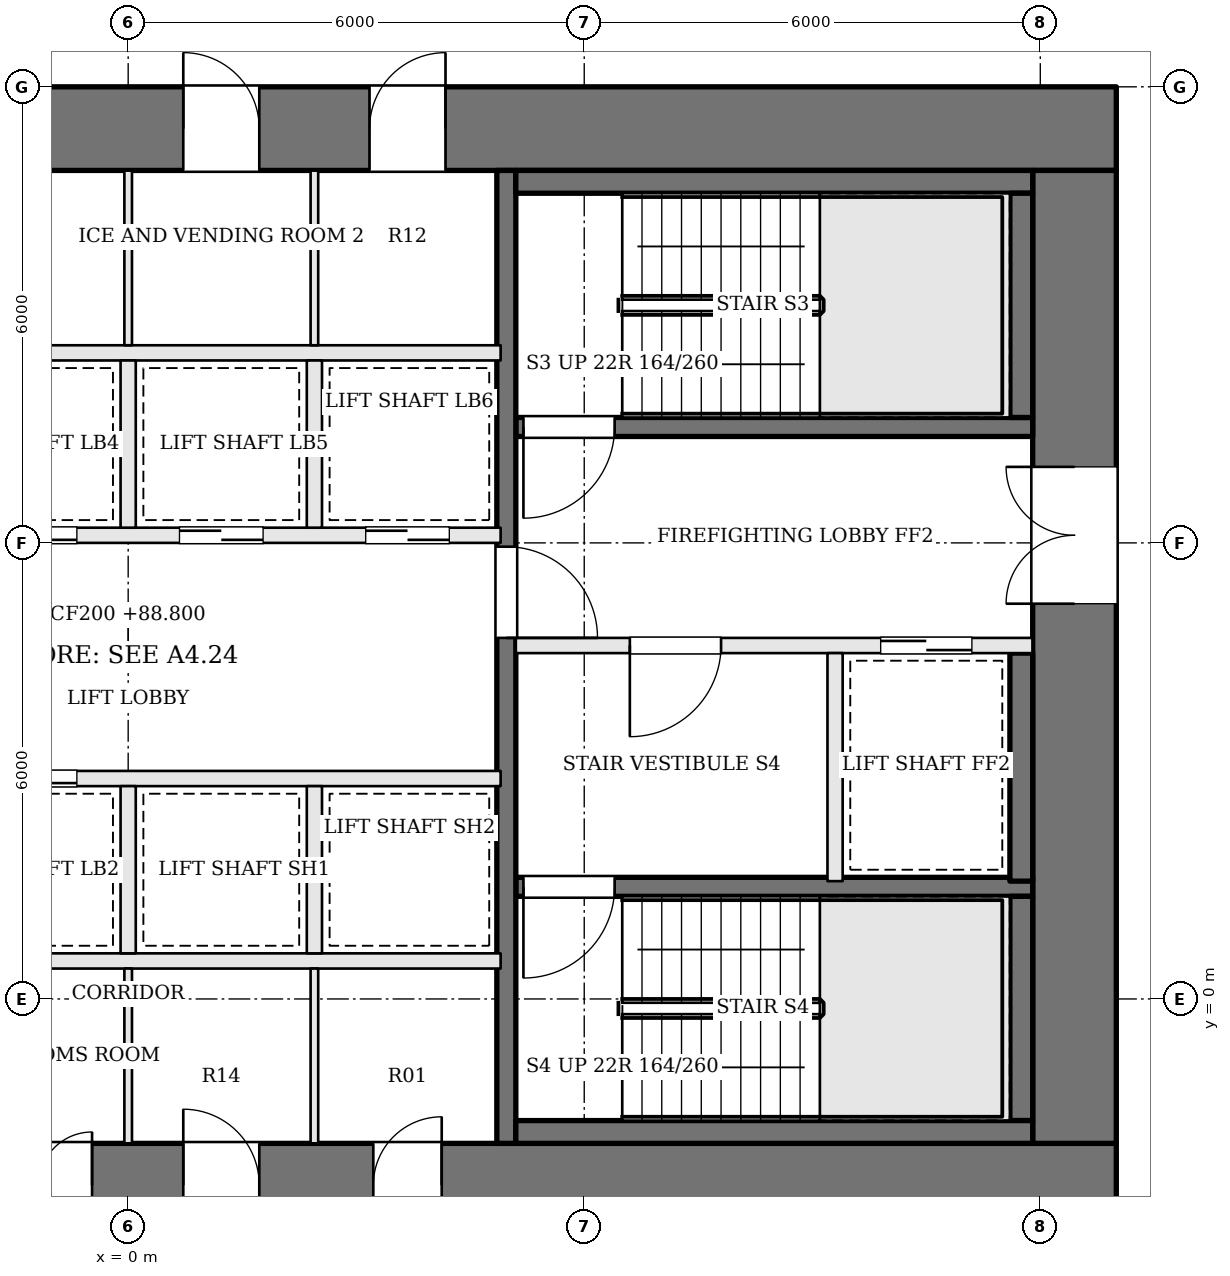
"""IFC4 building model, lengths in metres.
Left out: names, types, materials, properties, quantities, classifications, styles, units other than length and angle.
Written with IfcOpenShell. Run it as: python <this file> out.ifc"""

import sys

from ifc_helpers import new_model, si_unit, direction, frame, frame_2d, origin, place, context, subcontext, project, spatial, rectangle, extrude, element, fill, save


model = new_model("IFC4")
c1 = context("Model", 3, precision=1e-05, world=origin(), true_north=direction((0.0, 1.0)))
c2 = subcontext(c1, "Body", "Model", "MODEL_VIEW")
j1 = project(units=[si_unit("LENGTHUNIT", "METRE"), si_unit("PLANEANGLEUNIT", "RADIAN")], contexts=[c1])
p1 = place(None, origin())
s1 = spatial("IfcSite", under=j1, at=p1, CompositionType="ELEMENT")
p2 = place(p1, origin())
s2 = spatial("IfcBuilding", under=s1, at=p2, CompositionType="ELEMENT")
p3 = place(p2, frame((0.0, 0.0, 88.8)))
s3 = spatial("IfcBuildingStorey", under=s2, at=p3, CompositionType="ELEMENT", Elevation=88.8)
p4 = place(p3, frame((-13.0, 11.45, 0.0), z_axis=(0.0, 0.0, 1.0), x_axis=(1.0, 0.0, 0.0)))
e1 = element("IfcWall", 1, at=p4, inside=s3, PredefinedType="SHEAR", context=c2, shape_type="SweptSolid", body=[
    extrude(rectangle(XDim=26.0, YDim=1.1, at=frame_2d((13.0, 0.0))), origin(), (0.0, 0.0, 1.0), 3.6),
])
p5 = place(p4, frame((8.575, 0.0, 0.0)))
e2 = element("IfcOpeningElement", 2, at=p5, cuts=e1, PredefinedType="OPENING", context=c2, shape_type="SweptSolid", body=[
    extrude(rectangle(XDim=0.7, YDim=2.1, at=frame_2d((0.35, 1.05))), frame((0.0, 0.56, 0.0), z_axis=(0.0, -1.0, 0.0), x_axis=(1.0, 0.0, 0.0)), (0.0, 0.0, 1.0), 1.12),
])
p6 = place(p4, frame((10.875, 0.0, 0.0)))
e3 = element("IfcOpeningElement", 3, at=p6, cuts=e1, PredefinedType="OPENING", context=c2, shape_type="SweptSolid", body=[
    extrude(rectangle(XDim=1.0, YDim=2.1, at=frame_2d((0.5, 1.05))), frame((0.0, 0.56, 0.0), z_axis=(0.0, -1.0, 0.0), x_axis=(1.0, 0.0, 0.0)), (0.0, 0.0, 1.0), 1.12),
])
p7 = place(p4, frame((13.725, 0.0, 0.0)))
e4 = element("IfcOpeningElement", 4, at=p7, cuts=e1, PredefinedType="OPENING", context=c2, shape_type="SweptSolid", body=[
    extrude(rectangle(XDim=1.0, YDim=2.1, at=frame_2d((0.5, 1.05))), frame((0.0, 0.56, 0.0), z_axis=(0.0, -1.0, 0.0), x_axis=(1.0, 0.0, 0.0)), (0.0, 0.0, 1.0), 1.12),
])
p8 = place(p4, frame((16.175, 0.0, 0.0)))
e5 = element("IfcOpeningElement", 5, at=p8, cuts=e1, PredefinedType="OPENING", context=c2, shape_type="SweptSolid", body=[
    extrude(rectangle(XDim=1.0, YDim=2.1, at=frame_2d((0.5, 1.05))), frame((0.0, 0.56, 0.0), z_axis=(0.0, -1.0, 0.0), x_axis=(1.0, 0.0, 0.0)), (0.0, 0.0, 1.0), 1.12),
])
p9 = place(p3, frame((-13.0, -2.45, 0.0), z_axis=(0.0, 0.0, 1.0), x_axis=(1.0, 0.0, 0.0)))
e6 = element("IfcWall", 6, at=p9, inside=s3, PredefinedType="SHEAR", context=c2, shape_type="SweptSolid", body=[
    extrude(rectangle(XDim=26.0, YDim=1.1, at=frame_2d((13.0, 0.0))), origin(), (0.0, 0.0, 1.0), 3.6),
])
p10 = place(p9, frame((9.225, 0.0, 0.0)))
e7 = element("IfcOpeningElement", 7, at=p10, cuts=e6, PredefinedType="OPENING", context=c2, shape_type="SweptSolid", body=[
    extrude(rectangle(XDim=1.0, YDim=2.1, at=frame_2d((0.5, 1.05))), frame((0.0, 0.56, 0.0), z_axis=(0.0, -1.0, 0.0), x_axis=(1.0, 0.0, 0.0)), (0.0, 0.0, 1.0), 1.12),
])
p11 = place(p9, frame((11.825, 0.0, 0.0)))
e8 = element("IfcOpeningElement", 8, at=p11, cuts=e6, PredefinedType="OPENING", context=c2, shape_type="SweptSolid", body=[
    extrude(rectangle(XDim=0.7, YDim=2.1, at=frame_2d((0.35, 1.05))), frame((0.0, 0.56, 0.0), z_axis=(0.0, -1.0, 0.0), x_axis=(1.0, 0.0, 0.0)), (0.0, 0.0, 1.0), 1.12),
])
p12 = place(p9, frame((13.725, 0.0, 0.0)))
e9 = element("IfcOpeningElement", 9, at=p12, cuts=e6, PredefinedType="OPENING", context=c2, shape_type="SweptSolid", body=[
    extrude(rectangle(XDim=1.0, YDim=2.1, at=frame_2d((0.5, 1.05))), frame((0.0, 0.56, 0.0), z_axis=(0.0, -1.0, 0.0), x_axis=(1.0, 0.0, 0.0)), (0.0, 0.0, 1.0), 1.12),
])
p13 = place(p9, frame((16.225, 0.0, 0.0)))
e10 = element("IfcOpeningElement", 10, at=p13, cuts=e6, PredefinedType="OPENING", context=c2, shape_type="SweptSolid", body=[
    extrude(rectangle(XDim=0.9, YDim=2.1, at=frame_2d((0.45, 1.05))), frame((0.0, 0.56, 0.0), z_axis=(0.0, -1.0, 0.0), x_axis=(1.0, 0.0, 0.0)), (0.0, 0.0, 1.0), 1.12),
])
p14 = place(p3, frame((12.45, -1.9, 0.0), z_axis=(0.0, 0.0, 1.0), x_axis=(0.0, 1.0, 0.0)))
e11 = element("IfcWall", 11, at=p14, inside=s3, PredefinedType="SHEAR", context=c2, shape_type="SweptSolid", body=[
    extrude(rectangle(XDim=12.8, YDim=1.1, at=frame_2d((6.4, 0.0))), origin(), (0.0, 0.0, 1.0), 3.6),
])
p15 = place(p14, frame((7.1, 0.0, 0.0)))
e12 = element("IfcOpeningElement", 12, at=p15, cuts=e11, PredefinedType="OPENING", context=c2, shape_type="SweptSolid", body=[
    extrude(rectangle(XDim=1.8, YDim=2.1, at=frame_2d((0.9, 1.05))), frame((0.0, 0.56, 0.0), z_axis=(0.0, -1.0, 0.0), x_axis=(1.0, 0.0, 0.0)), (0.0, 0.0, 1.0), 1.12),
])
p16 = place(p3, frame((11.9, 7.525, 0.0), z_axis=(0.0, 0.0, 1.0), x_axis=(-1.0, 0.0, 0.0)))
e13 = element("IfcWall", 13, at=p16, inside=s3, PredefinedType="SOLIDWALL", context=c2, shape_type="SweptSolid", body=[
    extrude(rectangle(XDim=6.8, YDim=0.25, at=frame_2d((3.4, 0.0))), origin(), (0.0, 0.0, 1.0), 3.4),
])
p17 = place(p16, frame((5.5, 0.0, 0.0)))
e14 = element("IfcOpeningElement", 14, at=p17, cuts=e13, PredefinedType="OPENING", context=c2, shape_type="SweptSolid", body=[
    extrude(rectangle(XDim=1.2, YDim=2.1, at=frame_2d((0.6, 1.05))), frame((0.0, 0.135, 0.0), z_axis=(0.0, -1.0, 0.0), x_axis=(1.0, 0.0, 0.0)), (0.0, 0.0, 1.0), 0.27),
])
p18 = place(p3, frame((11.9, 4.65, 0.0), z_axis=(0.0, 0.0, 1.0), x_axis=(-1.0, 0.0, 0.0)))
e15 = element("IfcWall", 15, at=p18, inside=s3, PredefinedType="SOLIDWALL", context=c2, shape_type="SweptSolid", body=[
    extrude(rectangle(XDim=6.8, YDim=0.2, at=frame_2d((3.4, 0.0))), origin(), (0.0, 0.0, 1.0), 3.4),
])
p19 = place(p18, frame((4.1, 0.0, 0.0)))
e16 = element("IfcOpeningElement", 16, at=p19, cuts=e15, PredefinedType="OPENING", context=c2, shape_type="SweptSolid", body=[
    extrude(rectangle(XDim=1.2, YDim=2.1, at=frame_2d((0.6, 1.05))), frame((0.0, 0.11, 0.0), z_axis=(0.0, -1.0, 0.0), x_axis=(1.0, 0.0, 0.0)), (0.0, 0.0, 1.0), 0.22),
])
p20 = place(p18, frame((0.8, 0.0, 0.0)))
e17 = element("IfcOpeningElement", 17, at=p20, cuts=e15, PredefinedType="OPENING", context=c2, shape_type="SweptSolid", body=[
    extrude(rectangle(XDim=1.2, YDim=2.1, at=frame_2d((0.6, 1.05))), frame((0.0, 0.11, 0.0), z_axis=(0.0, -1.0, 0.0), x_axis=(1.0, 0.0, 0.0)), (0.0, 0.0, 1.0), 0.22),
])
p21 = place(p3, frame((11.9, 1.475, 0.0), z_axis=(0.0, 0.0, 1.0), x_axis=(-1.0, 0.0, 0.0)))
e18 = element("IfcWall", 18, at=p21, inside=s3, PredefinedType="SOLIDWALL", context=c2, shape_type="SweptSolid", body=[
    extrude(rectangle(XDim=6.8, YDim=0.25, at=frame_2d((3.4, 0.0))), origin(), (0.0, 0.0, 1.0), 3.4),
])
p22 = place(p21, frame((5.5, 0.0, 0.0)))
e19 = element("IfcOpeningElement", 19, at=p22, cuts=e18, PredefinedType="OPENING", context=c2, shape_type="SweptSolid", body=[
    extrude(rectangle(XDim=1.2, YDim=2.1, at=frame_2d((0.6, 1.05))), frame((0.0, 0.135, 0.0), z_axis=(0.0, -1.0, 0.0), x_axis=(1.0, 0.0, 0.0)), (0.0, 0.0, 1.0), 0.27),
])
p23 = place(p3, frame((9.3, 4.55, 0.0), z_axis=(0.0, 0.0, 1.0), x_axis=(0.0, -1.0, 0.0)))
e20 = element("IfcWall", 20, at=p23, inside=s3, PredefinedType="SOLIDWALL", context=c2, shape_type="SweptSolid", body=[
    extrude(rectangle(XDim=3.0, YDim=0.2, at=frame_2d((1.5, 0.0))), origin(), (0.0, 0.0, 1.0), 3.4),
])
p24 = place(p3, frame((4.975, 10.9, 0.0), z_axis=(0.0, 0.0, 1.0), x_axis=(0.0, -1.0, 0.0)))
e21 = element("IfcWall", 21, at=p24, inside=s3, PredefinedType="SOLIDWALL", context=c2, shape_type="SweptSolid", body=[
    extrude(rectangle(XDim=12.8, YDim=0.25, at=frame_2d((6.4, 0.0))), origin(), (0.0, 0.0, 1.0), 3.4),
])
p25 = place(p24, frame((4.95, 0.0, 0.0)))
e22 = element("IfcOpeningElement", 22, at=p25, cuts=e21, PredefinedType="OPENING", context=c2, shape_type="SweptSolid", body=[
    extrude(rectangle(XDim=1.2, YDim=2.1, at=frame_2d((0.6, 1.05))), frame((0.0, 0.135, 0.0), z_axis=(0.0, -1.0, 0.0), x_axis=(1.0, 0.0, 0.0)), (0.0, 0.0, 1.0), 0.27),
])
p26 = place(p3, frame((11.9, 10.75, 0.0), z_axis=(0.0, 0.0, 1.0), x_axis=(-1.0, 0.0, 0.0)))
e23 = element("IfcWall", 23, at=p26, inside=s3, PredefinedType="SOLIDWALL", context=c2, shape_type="SweptSolid", body=[
    extrude(rectangle(XDim=6.8, YDim=0.3, at=frame_2d((3.4, 0.0))), origin(), (0.0, 0.0, 1.0), 3.4),
])
p27 = place(p3, frame((11.75, 10.6, 0.0), z_axis=(0.0, 0.0, 1.0), x_axis=(0.0, -1.0, 0.0)))
e24 = element("IfcWall", 24, at=p27, inside=s3, PredefinedType="SOLIDWALL", context=c2, shape_type="SweptSolid", body=[
    extrude(rectangle(XDim=2.95, YDim=0.3, at=frame_2d((1.475, 0.0))), origin(), (0.0, 0.0, 1.0), 3.4),
])
p28 = place(p3, frame((11.75, 4.55, 0.0), z_axis=(0.0, 0.0, 1.0), x_axis=(0.0, -1.0, 0.0)))
e25 = element("IfcWall", 25, at=p28, inside=s3, PredefinedType="SOLIDWALL", context=c2, shape_type="SweptSolid", body=[
    extrude(rectangle(XDim=3.0, YDim=0.3, at=frame_2d((1.5, 0.0))), origin(), (0.0, 0.0, 1.0), 3.4),
])
p29 = place(p3, frame((11.75, 1.35, 0.0), z_axis=(0.0, 0.0, 1.0), x_axis=(0.0, -1.0, 0.0)))
e26 = element("IfcWall", 26, at=p29, inside=s3, PredefinedType="SOLIDWALL", context=c2, shape_type="SweptSolid", body=[
    extrude(rectangle(XDim=2.95, YDim=0.3, at=frame_2d((1.475, 0.0))), origin(), (0.0, 0.0, 1.0), 3.4),
])
p30 = place(p3, frame((11.9, -1.75, 0.0), z_axis=(0.0, 0.0, 1.0), x_axis=(-1.0, 0.0, 0.0)))
e27 = element("IfcWall", 27, at=p30, inside=s3, PredefinedType="SOLIDWALL", context=c2, shape_type="SweptSolid", body=[
    extrude(rectangle(XDim=6.8, YDim=0.3, at=frame_2d((3.4, 0.0))), origin(), (0.0, 0.0, 1.0), 3.4),
])
p31 = place(p3, frame((-4.9, 0.5, 0.0), z_axis=(0.0, 0.0, 1.0), x_axis=(1.0, 0.0, 0.0)))
e28 = element("IfcWall", 28, at=p31, inside=s3, PredefinedType="SOLIDWALL", context=c2, shape_type="SweptSolid", body=[
    extrude(rectangle(XDim=9.8, YDim=0.2, at=frame_2d((4.9, 0.0))), origin(), (0.0, 0.0, 1.0), 3.4),
])
p32 = place(p3, frame((-4.9, 2.9, 0.0), z_axis=(0.0, 0.0, 1.0), x_axis=(1.0, 0.0, 0.0)))
e29 = element("IfcWall", 29, at=p32, inside=s3, PredefinedType="SOLIDWALL", context=c2, shape_type="SweptSolid", body=[
    extrude(rectangle(XDim=9.8, YDim=0.2, at=frame_2d((4.9, 0.0))), origin(), (0.0, 0.0, 1.0), 3.4),
])
p33 = place(p32, frame((0.675, 0.0, 0.0)))
e30 = element("IfcOpeningElement", 30, at=p33, cuts=e29, PredefinedType="OPENING", context=c2, shape_type="SweptSolid", body=[
    extrude(rectangle(XDim=1.1, YDim=2.1, at=frame_2d((0.55, 1.05))), frame((0.0, 0.11, 0.0), z_axis=(0.0, -1.0, 0.0), x_axis=(1.0, 0.0, 0.0)), (0.0, 0.0, 1.0), 0.22),
])
p34 = place(p32, frame((3.125, 0.0, 0.0)))
e31 = element("IfcOpeningElement", 31, at=p34, cuts=e29, PredefinedType="OPENING", context=c2, shape_type="SweptSolid", body=[
    extrude(rectangle(XDim=1.1, YDim=2.1, at=frame_2d((0.55, 1.05))), frame((0.0, 0.11, 0.0), z_axis=(0.0, -1.0, 0.0), x_axis=(1.0, 0.0, 0.0)), (0.0, 0.0, 1.0), 0.22),
])
p35 = place(p3, frame((-4.9, 6.1, 0.0), z_axis=(0.0, 0.0, 1.0), x_axis=(1.0, 0.0, 0.0)))
e32 = element("IfcWall", 32, at=p35, inside=s3, PredefinedType="SOLIDWALL", context=c2, shape_type="SweptSolid", body=[
    extrude(rectangle(XDim=9.8, YDim=0.2, at=frame_2d((4.9, 0.0))), origin(), (0.0, 0.0, 1.0), 3.4),
])
p36 = place(p35, frame((0.675, 0.0, 0.0)))
e33 = element("IfcOpeningElement", 33, at=p36, cuts=e32, PredefinedType="OPENING", context=c2, shape_type="SweptSolid", body=[
    extrude(rectangle(XDim=1.1, YDim=2.1, at=frame_2d((0.55, 1.05))), frame((0.0, 0.11, 0.0), z_axis=(0.0, -1.0, 0.0), x_axis=(1.0, 0.0, 0.0)), (0.0, 0.0, 1.0), 0.22),
])
p37 = place(p35, frame((3.125, 0.0, 0.0)))
e34 = element("IfcOpeningElement", 34, at=p37, cuts=e32, PredefinedType="OPENING", context=c2, shape_type="SweptSolid", body=[
    extrude(rectangle(XDim=1.1, YDim=2.1, at=frame_2d((0.55, 1.05))), frame((0.0, 0.11, 0.0), z_axis=(0.0, -1.0, 0.0), x_axis=(1.0, 0.0, 0.0)), (0.0, 0.0, 1.0), 0.22),
])
p38 = place(p35, frame((5.575, 0.0, 0.0)))
e35 = element("IfcOpeningElement", 35, at=p38, cuts=e32, PredefinedType="OPENING", context=c2, shape_type="SweptSolid", body=[
    extrude(rectangle(XDim=1.1, YDim=2.1, at=frame_2d((0.55, 1.05))), frame((0.0, 0.11, 0.0), z_axis=(0.0, -1.0, 0.0), x_axis=(1.0, 0.0, 0.0)), (0.0, 0.0, 1.0), 0.22),
])
p39 = place(p35, frame((8.025, 0.0, 0.0)))
e36 = element("IfcOpeningElement", 36, at=p39, cuts=e32, PredefinedType="OPENING", context=c2, shape_type="SweptSolid", body=[
    extrude(rectangle(XDim=1.1, YDim=2.1, at=frame_2d((0.55, 1.05))), frame((0.0, 0.11, 0.0), z_axis=(0.0, -1.0, 0.0), x_axis=(1.0, 0.0, 0.0)), (0.0, 0.0, 1.0), 0.22),
])
p40 = place(p3, frame((-4.9, 8.5, 0.0), z_axis=(0.0, 0.0, 1.0), x_axis=(1.0, 0.0, 0.0)))
e37 = element("IfcWall", 37, at=p40, inside=s3, PredefinedType="SOLIDWALL", context=c2, shape_type="SweptSolid", body=[
    extrude(rectangle(XDim=9.8, YDim=0.2, at=frame_2d((4.9, 0.0))), origin(), (0.0, 0.0, 1.0), 3.4),
])
for number, where, z_axis, x_axis in (
    (38, (0.0, 0.6, 0.0), (0.0, 0.0, 1.0), (0.0, 1.0, 0.0)),
    (39, (2.45, 0.6, 0.0), (0.0, 0.0, 1.0), (0.0, 1.0, 0.0)),
    (40, (0.0, 6.2, 0.0), (0.0, 0.0, 1.0), (0.0, 1.0, 0.0)),
    (41, (2.45, 6.2, 0.0), (0.0, 0.0, 1.0), (0.0, 1.0, 0.0)),
):
    element("IfcWall", number, at=place(p3, frame(where, z_axis=z_axis, x_axis=x_axis)), inside=s3, PredefinedType="SOLIDWALL", context=c2, shape_type="SweptSolid", body=[
        extrude(rectangle(XDim=2.2, YDim=0.2, at=frame_2d((1.1, 0.0))), origin(), (0.0, 0.0, 1.0), 3.4),
    ])
for number, where, z_axis, x_axis in (
    (42, (0.0, -1.9, 0.0), (0.0, 0.0, 1.0), (0.0, 1.0, 0.0)),
    (43, (2.45, -1.9, 0.0), (0.0, 0.0, 1.0), (0.0, 1.0, 0.0)),
    (44, (0.0, 8.6, 0.0), (0.0, 0.0, 1.0), (0.0, 1.0, 0.0)),
    (45, (2.45, 8.6, 0.0), (0.0, 0.0, 1.0), (0.0, 1.0, 0.0)),
):
    element("IfcWall", number, at=place(p3, frame(where, z_axis=z_axis, x_axis=x_axis)), inside=s3, PredefinedType="PARTITIONING", context=c2, shape_type="SweptSolid", body=[
        extrude(rectangle(XDim=2.3, YDim=0.1, at=frame_2d((1.15, 0.0))), origin(), (0.0, 0.0, 1.0), 3.4),
    ])
p41 = place(p15, origin())
e46 = element("IfcDoor", 46, at=p41, inside=s3, OperationType="DOUBLE_DOOR_SINGLE_SWING", PredefinedType="DOOR", context=c2, shape_type="SweptSolid", body=[
    extrude(rectangle(XDim=1.8, YDim=2.1, at=frame_2d((0.9, 1.05))), frame((0.0, 0.025, 0.0), z_axis=(0.0, -1.0, 0.0), x_axis=(1.0, 0.0, 0.0)), (0.0, 0.0, 1.0), 0.05),
])
fill(e12, e46)
p42 = place(p25, origin())
e47 = element("IfcDoor", 47, at=p42, inside=s3, OperationType="SINGLE_SWING_RIGHT", PredefinedType="DOOR", context=c2, shape_type="SweptSolid", body=[
    extrude(rectangle(XDim=1.2, YDim=2.1, at=frame_2d((0.6, 1.05))), frame((0.0, 0.025, 0.0), z_axis=(0.0, -1.0, 0.0), x_axis=(1.0, 0.0, 0.0)), (0.0, 0.0, 1.0), 0.05),
])
fill(e22, e47)
p43 = place(p19, origin())
e48 = element("IfcDoor", 48, at=p43, inside=s3, OperationType="SINGLE_SWING_RIGHT", PredefinedType="DOOR", context=c2, shape_type="SweptSolid", body=[
    extrude(rectangle(XDim=1.2, YDim=2.1, at=frame_2d((0.6, 1.05))), frame((0.0, 0.025, 0.0), z_axis=(0.0, -1.0, 0.0), x_axis=(1.0, 0.0, 0.0)), (0.0, 0.0, 1.0), 0.05),
])
fill(e16, e48)
p44 = place(p17, origin())
e49 = element("IfcDoor", 49, at=p44, inside=s3, OperationType="SINGLE_SWING_RIGHT", PredefinedType="DOOR", context=c2, shape_type="SweptSolid", body=[
    extrude(rectangle(XDim=1.2, YDim=2.1, at=frame_2d((0.6, 1.05))), frame((0.0, 0.025, 0.0), z_axis=(0.0, -1.0, 0.0), x_axis=(1.0, 0.0, 0.0)), (0.0, 0.0, 1.0), 0.05),
])
fill(e14, e49)
p45 = place(p22, origin())
e50 = element("IfcDoor", 50, at=p45, inside=s3, OperationType="SINGLE_SWING_RIGHT", PredefinedType="DOOR", context=c2, shape_type="SweptSolid", body=[
    extrude(rectangle(XDim=1.2, YDim=2.1, at=frame_2d((0.6, 1.05))), frame((0.0, 0.025, 0.0), z_axis=(0.0, -1.0, 0.0), x_axis=(1.0, 0.0, 0.0)), (0.0, 0.0, 1.0), 0.05),
])
fill(e19, e50)
p46 = place(p20, origin())
e51 = element("IfcDoor", 51, at=p46, inside=s3, OperationType="SLIDING_TO_RIGHT", PredefinedType="DOOR", context=c2, shape_type="SweptSolid", body=[
    extrude(rectangle(XDim=1.2, YDim=2.1, at=frame_2d((0.6, 1.05))), frame((0.0, 0.025, 0.0), z_axis=(0.0, -1.0, 0.0), x_axis=(1.0, 0.0, 0.0)), (0.0, 0.0, 1.0), 0.05),
])
fill(e17, e51)
p47 = place(p34, origin())
e52 = element("IfcDoor", 52, at=p47, inside=s3, OperationType="SLIDING_TO_LEFT", PredefinedType="DOOR", context=c2, shape_type="SweptSolid", body=[
    extrude(rectangle(XDim=1.1, YDim=2.1, at=frame_2d((0.55, 1.05))), frame((0.0, 0.025, 0.0), z_axis=(0.0, -1.0, 0.0), x_axis=(1.0, 0.0, 0.0)), (0.0, 0.0, 1.0), 0.05),
])
fill(e31, e52)
p48 = place(p37, origin())
e53 = element("IfcDoor", 53, at=p48, inside=s3, OperationType="SLIDING_TO_LEFT", PredefinedType="DOOR", context=c2, shape_type="SweptSolid", body=[
    extrude(rectangle(XDim=1.1, YDim=2.1, at=frame_2d((0.55, 1.05))), frame((0.0, 0.025, 0.0), z_axis=(0.0, -1.0, 0.0), x_axis=(1.0, 0.0, 0.0)), (0.0, 0.0, 1.0), 0.05),
])
fill(e34, e53)
p49 = place(p38, origin())
e54 = element("IfcDoor", 54, at=p49, inside=s3, OperationType="SLIDING_TO_RIGHT", PredefinedType="DOOR", context=c2, shape_type="SweptSolid", body=[
    extrude(rectangle(XDim=1.1, YDim=2.1, at=frame_2d((0.55, 1.05))), frame((0.0, 0.025, 0.0), z_axis=(0.0, -1.0, 0.0), x_axis=(1.0, 0.0, 0.0)), (0.0, 0.0, 1.0), 0.05),
])
fill(e35, e54)
p50 = place(p39, origin())
e55 = element("IfcDoor", 55, at=p50, inside=s3, OperationType="SLIDING_TO_LEFT", PredefinedType="DOOR", context=c2, shape_type="SweptSolid", body=[
    extrude(rectangle(XDim=1.1, YDim=2.1, at=frame_2d((0.55, 1.05))), frame((0.0, 0.025, 0.0), z_axis=(0.0, -1.0, 0.0), x_axis=(1.0, 0.0, 0.0)), (0.0, 0.0, 1.0), 0.05),
])
fill(e36, e55)
p51 = place(p11, origin())
e56 = element("IfcDoor", 56, at=p51, inside=s3, OperationType="SINGLE_SWING_RIGHT", PredefinedType="DOOR", context=c2, shape_type="SweptSolid", body=[
    extrude(rectangle(XDim=0.7, YDim=2.1, at=frame_2d((0.35, 1.05))), frame((0.0, 0.025, 0.0), z_axis=(0.0, -1.0, 0.0), x_axis=(1.0, 0.0, 0.0)), (0.0, 0.0, 1.0), 0.05),
])
fill(e8, e56)
p52 = place(p12, origin())
e57 = element("IfcDoor", 57, at=p52, inside=s3, OperationType="SINGLE_SWING_LEFT", PredefinedType="DOOR", context=c2, shape_type="SweptSolid", body=[
    extrude(rectangle(XDim=1.0, YDim=2.1, at=frame_2d((0.5, 1.05))), frame((0.0, 0.025, 0.0), z_axis=(0.0, -1.0, 0.0), x_axis=(1.0, 0.0, 0.0)), (0.0, 0.0, 1.0), 0.05),
])
fill(e9, e57)
p53 = place(p13, origin())
e58 = element("IfcDoor", 58, at=p53, inside=s3, OperationType="SINGLE_SWING_RIGHT", PredefinedType="DOOR", context=c2, shape_type="SweptSolid", body=[
    extrude(rectangle(XDim=0.9, YDim=2.1, at=frame_2d((0.45, 1.05))), frame((0.0, 0.025, 0.0), z_axis=(0.0, -1.0, 0.0), x_axis=(1.0, 0.0, 0.0)), (0.0, 0.0, 1.0), 0.05),
])
fill(e10, e58)
p54 = place(p7, origin())
e59 = element("IfcDoor", 59, at=p54, inside=s3, OperationType="SINGLE_SWING_LEFT", PredefinedType="DOOR", context=c2, shape_type="SweptSolid", body=[
    extrude(rectangle(XDim=1.0, YDim=2.1, at=frame_2d((0.5, 1.05))), frame((0.0, 0.025, 0.0), z_axis=(0.0, -1.0, 0.0), x_axis=(1.0, 0.0, 0.0)), (0.0, 0.0, 1.0), 0.05),
])
fill(e4, e59)
p55 = place(p8, origin())
e60 = element("IfcDoor", 60, at=p55, inside=s3, OperationType="SINGLE_SWING_RIGHT", PredefinedType="DOOR", context=c2, shape_type="SweptSolid", body=[
    extrude(rectangle(XDim=1.0, YDim=2.1, at=frame_2d((0.5, 1.05))), frame((0.0, 0.025, 0.0), z_axis=(0.0, -1.0, 0.0), x_axis=(1.0, 0.0, 0.0)), (0.0, 0.0, 1.0), 0.05),
])
fill(e5, e60)
save(model, sys.argv[1])
